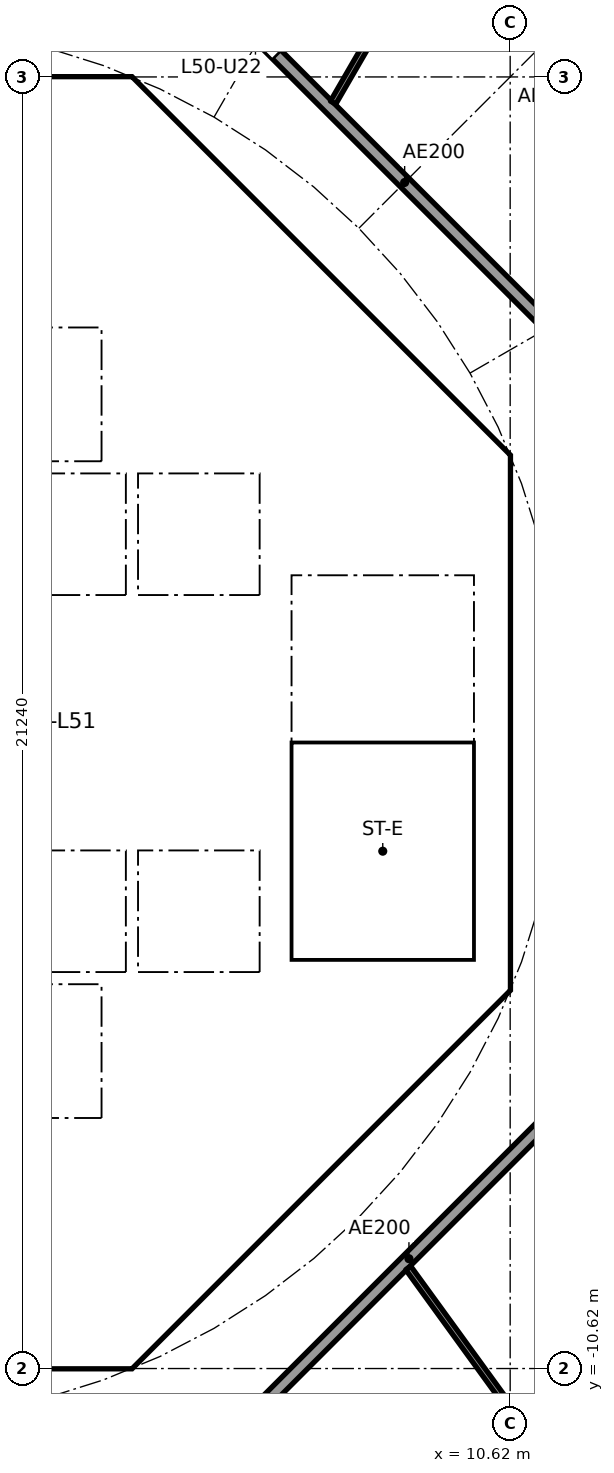
"""IFC4 building model, lengths in metres.
Left out: names, types, materials, properties, quantities, classifications, styles, units other than length and angle.
Written with IfcOpenShell. Run it as: python <this file> out.ifc"""

import sys

from ifc_helpers import new_model, si_unit, direction, frame, frame_2d, origin, place, context, subcontext, project, spatial, polyline, rectangle, outline, extrude, element, fill, save


model = new_model("IFC4")
c1 = context("Model", 3, precision=1e-05, world=origin(), true_north=direction((0.0, 1.0)))
c2 = subcontext(c1, "Body", "Model", "MODEL_VIEW")
j1 = project(units=[si_unit("LENGTHUNIT", "METRE"), si_unit("PLANEANGLEUNIT", "RADIAN")], contexts=[c1])
p1 = place(None, origin())
s1 = spatial("IfcSite", under=j1, at=p1, CompositionType="ELEMENT")
p2 = place(p1, origin())
s2 = spatial("IfcBuilding", under=s1, at=p2, CompositionType="ELEMENT")
p3 = place(p2, frame((0.0, 0.0, 199.2)))
s3 = spatial("IfcBuildingStorey", under=s2, at=p3, CompositionType="ELEMENT", Elevation=199.2)
p4 = place(p3, frame((9.988, 4.613, 0.0), z_axis=(0.0, 0.0, 1.0), x_axis=(-0.707106781187, 0.707106781187, 0.0)))
e1 = element("IfcWall", 1, at=p4, inside=s3, PredefinedType="SHEAR", context=c2, shape_type="SweptSolid", body=[
    extrude(rectangle(XDim=7.602, YDim=0.6, at=frame_2d((3.801, 0.0))), origin(), (0.0, 0.0, 1.0), 3.44),
])
p5 = place(p4, frame((3.201, 0.0, 0.0)))
e2 = element("IfcOpeningElement", 2, at=p5, cuts=e1, PredefinedType="OPENING", context=c2, shape_type="SweptSolid", body=[
    extrude(rectangle(XDim=1.2, YDim=2.1, at=frame_2d((0.6, 1.05))), frame((0.0, 0.31, 0.0), z_axis=(0.0, -1.0, 0.0), x_axis=(1.0, 0.0, 0.0)), (0.0, 0.0, 1.0), 0.62),
])
p6 = place(p3, frame((4.613, -9.988, 0.0), z_axis=(0.0, 0.0, 1.0), x_axis=(0.707106781187, 0.707106781187, 0.0)))
e3 = element("IfcWall", 3, at=p6, inside=s3, PredefinedType="SHEAR", context=c2, shape_type="SweptSolid", body=[
    extrude(rectangle(XDim=7.602, YDim=0.6, at=frame_2d((3.801, 0.0))), origin(), (0.0, 0.0, 1.0), 3.44),
])
p7 = place(p6, frame((3.201, 0.0, 0.0)))
e4 = element("IfcOpeningElement", 4, at=p7, cuts=e3, PredefinedType="OPENING", context=c2, shape_type="SweptSolid", body=[
    extrude(rectangle(XDim=1.2, YDim=2.1, at=frame_2d((0.6, 1.05))), frame((0.0, 0.31, 0.0), z_axis=(0.0, -1.0, 0.0), x_axis=(1.0, 0.0, 0.0)), (0.0, 0.0, 1.0), 0.62),
])
p8 = place(p3, frame((4.0, 4.3, 0.0), z_axis=(0.0, 0.0, 1.0), x_axis=(0.0, 1.0, 0.0)))
e5 = element("IfcWall", 5, at=p8, inside=s3, PredefinedType="SOLIDWALL", context=c2, shape_type="SweptSolid", body=[
    extrude(rectangle(XDim=2.2, YDim=0.2, at=frame_2d((1.1, 0.0))), origin(), (0.0, 0.0, 1.0), 3.44),
])
p9 = place(p8, frame((0.55, 0.0, 0.0)))
e6 = element("IfcOpeningElement", 6, at=p9, cuts=e5, PredefinedType="OPENING", context=c2, shape_type="SweptSolid", body=[
    extrude(rectangle(XDim=1.1, YDim=2.1, at=frame_2d((0.55, 1.05))), frame((0.0, 0.11, 0.0), z_axis=(0.0, -1.0, 0.0), x_axis=(1.0, 0.0, 0.0)), (0.0, 0.0, 1.0), 0.22),
])
p10 = place(p3, frame((-6.7, 2.0, 0.0), z_axis=(0.0, 0.0, 1.0), x_axis=(1.0, 0.0, 0.0)))
e7 = element("IfcWall", 7, at=p10, inside=s3, PredefinedType="SOLIDWALL", context=c2, shape_type="SweptSolid", body=[
    extrude(rectangle(XDim=13.4, YDim=0.2, at=frame_2d((6.7, 0.0))), origin(), (0.0, 0.0, 1.0), 3.44),
])
p11 = place(p10, frame((7.25, 0.0, 0.0)))
e8 = element("IfcOpeningElement", 8, at=p11, cuts=e7, PredefinedType="OPENING", context=c2, shape_type="SweptSolid", body=[
    extrude(rectangle(XDim=1.1, YDim=2.1, at=frame_2d((0.55, 1.05))), frame((0.0, 0.11, 0.0), z_axis=(0.0, -1.0, 0.0), x_axis=(1.0, 0.0, 0.0)), (0.0, 0.0, 1.0), 0.22),
])
p12 = place(p10, frame((9.45, 0.0, 0.0)))
e9 = element("IfcOpeningElement", 9, at=p12, cuts=e7, PredefinedType="OPENING", context=c2, shape_type="SweptSolid", body=[
    extrude(rectangle(XDim=1.1, YDim=2.1, at=frame_2d((0.55, 1.05))), frame((0.0, 0.11, 0.0), z_axis=(0.0, -1.0, 0.0), x_axis=(1.0, 0.0, 0.0)), (0.0, 0.0, 1.0), 0.22),
])
p13 = place(p10, frame((2.95, 0.0, 0.0)))
e10 = element("IfcOpeningElement", 10, at=p13, cuts=e7, PredefinedType="OPENING", context=c2, shape_type="SweptSolid", body=[
    extrude(rectangle(XDim=0.9, YDim=2.1, at=frame_2d((0.45, 1.05))), frame((0.0, 0.11, 0.0), z_axis=(0.0, -1.0, 0.0), x_axis=(1.0, 0.0, 0.0)), (0.0, 0.0, 1.0), 0.22),
])
p14 = place(p3, frame((6.7, 4.0, 0.0), z_axis=(0.0, 0.0, 1.0), x_axis=(1.0, 0.0, 0.0)))
e11 = element("IfcWall", 11, at=p14, inside=s3, PredefinedType="SOLIDWALL", context=c2, shape_type="SweptSolid", body=[
    extrude(rectangle(XDim=3.325, YDim=0.2, at=frame_2d((1.662, 0.0))), origin(), (0.0, 0.0, 1.0), 3.44),
])
p15 = place(p14, frame((1.25, 0.0, 0.0)))
e12 = element("IfcOpeningElement", 12, at=p15, cuts=e11, PredefinedType="OPENING", context=c2, shape_type="SweptSolid", body=[
    extrude(rectangle(XDim=1.1, YDim=2.1, at=frame_2d((0.55, 1.05))), frame((0.0, 0.11, 0.0), z_axis=(0.0, -1.0, 0.0), x_axis=(1.0, 0.0, 0.0)), (0.0, 0.0, 1.0), 0.22),
])
p16 = place(p3, frame((4.0, 7.025, 0.0), z_axis=(0.0, 0.0, 1.0), x_axis=(0.0, 1.0, 0.0)))
e13 = element("IfcWall", 13, at=p16, inside=s3, PredefinedType="SOLIDWALL", context=c2, shape_type="SweptSolid", body=[
    extrude(rectangle(XDim=3.0, YDim=0.2, at=frame_2d((1.5, 0.0))), origin(), (0.0, 0.0, 1.0), 3.44),
])
p17 = place(p16, frame((0.925, 0.0, 0.0)))
e14 = element("IfcOpeningElement", 14, at=p17, cuts=e13, PredefinedType="OPENING", context=c2, shape_type="SweptSolid", body=[
    extrude(rectangle(XDim=1.1, YDim=2.1, at=frame_2d((0.55, 1.05))), frame((0.0, 0.11, 0.0), z_axis=(0.0, -1.0, 0.0), x_axis=(1.0, 0.0, 0.0)), (0.0, 0.0, 1.0), 0.22),
])
p18 = place(p3, frame((4.0, -10.025, 0.0), z_axis=(0.0, 0.0, 1.0), x_axis=(0.0, 1.0, 0.0)))
e15 = element("IfcWall", 15, at=p18, inside=s3, PredefinedType="SOLIDWALL", context=c2, shape_type="SweptSolid", body=[
    extrude(rectangle(XDim=3.0, YDim=0.2, at=frame_2d((1.5, 0.0))), origin(), (0.0, 0.0, 1.0), 3.44),
])
p19 = place(p18, frame((0.975, 0.0, 0.0)))
e16 = element("IfcOpeningElement", 16, at=p19, cuts=e15, PredefinedType="OPENING", context=c2, shape_type="SweptSolid", body=[
    extrude(rectangle(XDim=1.1, YDim=2.1, at=frame_2d((0.55, 1.05))), frame((0.0, 0.11, 0.0), z_axis=(0.0, -1.0, 0.0), x_axis=(1.0, 0.0, 0.0)), (0.0, 0.0, 1.0), 0.22),
])
p20 = place(p3, frame((4.0, -6.5, 0.0), z_axis=(0.0, 0.0, 1.0), x_axis=(0.0, 1.0, 0.0)))
e17 = element("IfcWall", 17, at=p20, inside=s3, PredefinedType="SOLIDWALL", context=c2, shape_type="SweptSolid", body=[
    extrude(rectangle(XDim=2.2, YDim=0.2, at=frame_2d((1.1, 0.0))), origin(), (0.0, 0.0, 1.0), 3.44),
])
p21 = place(p20, frame((0.55, 0.0, 0.0)))
e18 = element("IfcOpeningElement", 18, at=p21, cuts=e17, PredefinedType="OPENING", context=c2, shape_type="SweptSolid", body=[
    extrude(rectangle(XDim=1.1, YDim=2.1, at=frame_2d((0.55, 1.05))), frame((0.0, 0.11, 0.0), z_axis=(0.0, -1.0, 0.0), x_axis=(1.0, 0.0, 0.0)), (0.0, 0.0, 1.0), 0.22),
])
p22 = place(p3, frame((-6.7, -2.0, 0.0), z_axis=(0.0, 0.0, 1.0), x_axis=(1.0, 0.0, 0.0)))
e19 = element("IfcWall", 19, at=p22, inside=s3, PredefinedType="SOLIDWALL", context=c2, shape_type="SweptSolid", body=[
    extrude(rectangle(XDim=13.4, YDim=0.2, at=frame_2d((6.7, 0.0))), origin(), (0.0, 0.0, 1.0), 3.44),
])
p23 = place(p22, frame((5.05, 0.0, 0.0)))
e20 = element("IfcOpeningElement", 20, at=p23, cuts=e19, PredefinedType="OPENING", context=c2, shape_type="SweptSolid", body=[
    extrude(rectangle(XDim=1.1, YDim=2.1, at=frame_2d((0.55, 1.05))), frame((0.0, 0.11, 0.0), z_axis=(0.0, -1.0, 0.0), x_axis=(1.0, 0.0, 0.0)), (0.0, 0.0, 1.0), 0.22),
])
p24 = place(p22, frame((7.25, 0.0, 0.0)))
e21 = element("IfcOpeningElement", 21, at=p24, cuts=e19, PredefinedType="OPENING", context=c2, shape_type="SweptSolid", body=[
    extrude(rectangle(XDim=1.1, YDim=2.1, at=frame_2d((0.55, 1.05))), frame((0.0, 0.11, 0.0), z_axis=(0.0, -1.0, 0.0), x_axis=(1.0, 0.0, 0.0)), (0.0, 0.0, 1.0), 0.22),
])
p25 = place(p22, frame((0.75, 0.0, 0.0)))
e22 = element("IfcOpeningElement", 22, at=p25, cuts=e19, PredefinedType="OPENING", context=c2, shape_type="SweptSolid", body=[
    extrude(rectangle(XDim=0.9, YDim=2.1, at=frame_2d((0.45, 1.05))), frame((0.0, 0.11, 0.0), z_axis=(0.0, -1.0, 0.0), x_axis=(1.0, 0.0, 0.0)), (0.0, 0.0, 1.0), 0.22),
])
p26 = place(p22, frame((2.95, 0.0, 0.0)))
e23 = element("IfcOpeningElement", 23, at=p26, cuts=e19, PredefinedType="OPENING", context=c2, shape_type="SweptSolid", body=[
    extrude(rectangle(XDim=0.9, YDim=2.1, at=frame_2d((0.45, 1.05))), frame((0.0, 0.11, 0.0), z_axis=(0.0, -1.0, 0.0), x_axis=(1.0, 0.0, 0.0)), (0.0, 0.0, 1.0), 0.22),
])
p27 = place(p3, origin())
e24 = element("IfcWall", 24, at=p27, inside=s3, PredefinedType="SHEAR", context=c2, shape_type="SweptSolid", body=[
    extrude(outline(polyline([(-4.152, -10.025), (4.152, -10.025), (4.401, -9.776), (4.825, -10.2), (4.401, -10.625), (-4.401, -10.625), (-4.825, -10.2), (-4.401, -9.776), (-4.152, -10.025)])), origin(), (0.0, 0.0, 1.0), 3.44),
])
p28 = place(p3, origin())
e25 = element("IfcWall", 25, at=p28, inside=s3, PredefinedType="SHEAR", context=c2, shape_type="SweptSolid", body=[
    extrude(outline(polyline([(-4.152, 10.025), (-4.401, 9.776), (-4.825, 10.2), (-4.401, 10.625), (4.401, 10.625), (4.825, 10.2), (4.401, 9.776), (4.152, 10.025), (-4.152, 10.025)])), origin(), (0.0, 0.0, 1.0), 3.44),
])
p29 = place(p3, origin())
e26 = element("IfcWall", 26, at=p29, inside=s3, PredefinedType="SHEAR", context=c2, shape_type="SweptSolid", body=[
    extrude(outline(polyline([(9.776, -4.401), (10.025, -4.152), (10.025, -3.801), (10.025, 4.152), (9.776, 4.401), (10.2, 4.825), (10.625, 4.401), (10.625, -4.401), (10.2, -4.825), (9.776, -4.401)])), origin(), (0.0, 0.0, 1.0), 3.44),
])
p30 = place(p3, origin())
e27 = element("IfcWall", 27, at=p30, inside=s3, PredefinedType="SOLIDWALL", context=c2, shape_type="SweptSolid", body=[
    extrude(outline(polyline([(-6.7, -2.1), (-6.5, -2.1), (-6.5, -4.1), (-4.5, -4.1), (-4.5, -2.1), (-4.3, -2.1), (-4.3, -4.1), (-2.3, -4.1), (-2.3, -2.1), (-2.1, -2.1), (-2.1, -4.1), (-0.1, -4.1), (-0.1, -2.1), (0.1, -2.1), (0.1, -4.1), (2.1, -4.1), (2.1, -2.1), (2.3, -2.1), (2.3, -4.1), (4.3, -4.1), (4.3, -2.1), (4.5, -2.1), (4.5, -4.1), (6.5, -4.1), (6.5, -2.1), (6.7, -2.1), (6.7, -4.3), (-6.7, -4.3), (-6.7, -2.1)])), origin(), (0.0, 0.0, 1.0), 3.44),
])
p31 = place(p3, origin())
e28 = element("IfcWall", 28, at=p31, inside=s3, PredefinedType="SOLIDWALL", context=c2, shape_type="SweptSolid", body=[
    extrude(outline(polyline([(-6.7, 4.3), (6.7, 4.3), (6.7, 2.1), (6.5, 2.1), (6.5, 4.1), (4.5, 4.1), (4.5, 2.1), (4.3, 2.1), (4.3, 4.1), (2.3, 4.1), (2.3, 2.1), (2.1, 2.1), (2.1, 4.1), (0.1, 4.1), (0.1, 2.1), (-0.1, 2.1), (-0.1, 4.1), (-6.5, 4.1), (-6.5, 2.1), (-6.7, 2.1), (-6.7, 4.3)])), origin(), (0.0, 0.0, 1.0), 3.44),
])
p32 = place(p3, origin())
e29 = element("IfcWall", 29, at=p32, inside=s3, PredefinedType="SOLIDWALL", context=c2, shape_type="SweptSolid", body=[
    extrude(outline(polyline([(4.1, -7.025), (-4.1, -7.025), (-4.1, -6.5), (4.1, -6.5), (4.1, -7.025)])), origin(), (0.0, 0.0, 1.0), 3.44),
])
p33 = place(p3, origin())
e30 = element("IfcWall", 30, at=p33, inside=s3, PredefinedType="SOLIDWALL", context=c2, shape_type="SweptSolid", body=[
    extrude(outline(polyline([(4.1, 6.5), (-4.1, 6.5), (-4.1, 7.025), (4.1, 7.025), (4.1, 6.5)])), origin(), (0.0, 0.0, 1.0), 3.44),
])
p34 = place(p3, origin())
e31 = element("IfcWall", 31, at=p34, inside=s3, PredefinedType="SOLIDWALL", context=c2, shape_type="SweptSolid", body=[
    extrude(outline(polyline([(7.025, -3.9), (6.7, -3.9), (6.7, 3.9), (7.025, 3.9), (7.025, -3.9)])), origin(), (0.0, 0.0, 1.0), 3.44),
])
p35 = place(p3, origin())
e32 = element("IfcWall", 32, at=p35, inside=s3, PredefinedType="SOLIDWALL", context=c2, shape_type="SweptSolid", body=[
    extrude(outline(polyline([(10.025, -4.1), (6.7, -4.1), (6.7, -3.9), (10.025, -3.9), (10.025, -4.1)])), origin(), (0.0, 0.0, 1.0), 3.44),
])
p36 = place(p3, frame((12.635, 5.134, 0.0), z_axis=(0.0, 0.0, 1.0), x_axis=(-0.707106781187, 0.707106781187, 0.0)))
e33 = element("IfcWall", 33, at=p36, inside=s3, PredefinedType="PARTITIONING", context=c2, shape_type="SweptSolid", body=[
    extrude(rectangle(XDim=10.609, YDim=0.2, at=frame_2d((5.305, 0.0))), origin(), (0.0, 0.0, 1.0), 3.44),
])
p37 = place(p36, frame((8.274, 0.0, 0.0)))
e34 = element("IfcOpeningElement", 34, at=p37, cuts=e33, PredefinedType="OPENING", context=c2, shape_type="SweptSolid", body=[
    extrude(rectangle(XDim=1.0, YDim=2.1, at=frame_2d((0.5, 1.05))), frame((0.0, 0.11, 0.0), z_axis=(0.0, -1.0, 0.0), x_axis=(1.0, 0.0, 0.0)), (0.0, 0.0, 1.0), 0.22),
])
p38 = place(p3, frame((5.275, -12.494, 0.0), z_axis=(0.0, 0.0, 1.0), x_axis=(0.707106781187, 0.707106781187, 0.0)))
e35 = element("IfcWall", 35, at=p38, inside=s3, PredefinedType="PARTITIONING", context=c2, shape_type="SweptSolid", body=[
    extrude(rectangle(XDim=10.409, YDim=0.2, at=frame_2d((5.205, 0.0))), origin(), (0.0, 0.0, 1.0), 3.44),
])
p39 = place(p3, frame((7.708, 10.198, 0.0), z_axis=(0.0, 0.0, 1.0), x_axis=(0.501288100085, 0.865280440501, 0.0)))
e36 = element("IfcWall", 36, at=p39, inside=s3, PredefinedType="PARTITIONING", context=c2, shape_type="SweptSolid", body=[
    extrude(rectangle(XDim=10.623, YDim=0.1, at=frame_2d((5.312, 0.0))), origin(), (0.0, 0.0, 1.0), 2.756),
])
p40 = place(p39, frame((2.082, 0.0, 0.0)))
e37 = element("IfcOpeningElement", 37, at=p40, cuts=e36, PredefinedType="OPENING", context=c2, shape_type="SweptSolid", body=[
    extrude(rectangle(XDim=0.9, YDim=2.1, at=frame_2d((0.45, 1.05))), frame((0.0, 0.06, 0.0), z_axis=(0.0, -1.0, 0.0), x_axis=(1.0, 0.0, 0.0)), (0.0, 0.0, 1.0), 0.12),
])
p41 = place(p39, frame((7.369, 0.0, 0.0)))
e38 = element("IfcOpeningElement", 38, at=p41, cuts=e36, PredefinedType="OPENING", context=c2, shape_type="SweptSolid", body=[
    extrude(rectangle(XDim=0.9, YDim=2.1, at=frame_2d((0.45, 1.05))), frame((0.0, 0.06, 0.0), z_axis=(0.0, -1.0, 0.0), x_axis=(1.0, 0.0, 0.0)), (0.0, 0.0, 1.0), 0.12),
])
p42 = place(p3, frame((8.943, -8.966, 0.0), z_axis=(0.0, 0.0, 1.0), x_axis=(0.587181355751, -0.809455406714, 0.0)))
e39 = element("IfcWall", 39, at=p42, inside=s3, PredefinedType="PARTITIONING", context=c2, shape_type="SweptSolid", body=[
    extrude(rectangle(XDim=10.441, YDim=0.1, at=frame_2d((5.221, 0.0))), origin(), (0.0, 0.0, 1.0), 2.756),
])
p43 = place(p12, origin())
e40 = element("IfcDoor", 40, at=p43, inside=s3, OperationType="DOUBLE_DOOR_SLIDING", PredefinedType="DOOR", context=c2, shape_type="SweptSolid", body=[
    extrude(rectangle(XDim=1.1, YDim=2.1, at=frame_2d((0.55, 1.05))), frame((0.0, 0.025, 0.0), z_axis=(0.0, -1.0, 0.0), x_axis=(1.0, 0.0, 0.0)), (0.0, 0.0, 1.0), 0.05),
])
fill(e9, e40)
p44 = place(p9, origin())
e41 = element("IfcDoor", 41, at=p44, inside=s3, OperationType="DOUBLE_DOOR_SLIDING", PredefinedType="DOOR", context=c2, shape_type="SweptSolid", body=[
    extrude(rectangle(XDim=1.1, YDim=2.1, at=frame_2d((0.55, 1.05))), frame((0.0, 0.025, 0.0), z_axis=(0.0, -1.0, 0.0), x_axis=(1.0, 0.0, 0.0)), (0.0, 0.0, 1.0), 0.05),
])
fill(e6, e41)
p45 = place(p21, origin())
e42 = element("IfcDoor", 42, at=p45, inside=s3, OperationType="DOUBLE_DOOR_SLIDING", PredefinedType="DOOR", context=c2, shape_type="SweptSolid", body=[
    extrude(rectangle(XDim=1.1, YDim=2.1, at=frame_2d((0.55, 1.05))), frame((0.0, 0.025, 0.0), z_axis=(0.0, -1.0, 0.0), x_axis=(1.0, 0.0, 0.0)), (0.0, 0.0, 1.0), 0.05),
])
fill(e18, e42)
p46 = place(p15, frame((1.1, 0.0, 0.0), x_axis=(-1.0, 0.0, 0.0)))
e43 = element("IfcDoor", 43, at=p46, inside=s3, OperationType="SINGLE_SWING_LEFT", PredefinedType="DOOR", context=c2, shape_type="SweptSolid", body=[
    extrude(rectangle(XDim=1.1, YDim=2.1, at=frame_2d((0.55, 1.05))), frame((0.0, 0.025, 0.0), z_axis=(0.0, -1.0, 0.0), x_axis=(1.0, 0.0, 0.0)), (0.0, 0.0, 1.0), 0.05),
])
fill(e12, e43)
p47 = place(p17, origin())
e44 = element("IfcDoor", 44, at=p47, inside=s3, OperationType="SINGLE_SWING_RIGHT", PredefinedType="DOOR", context=c2, shape_type="SweptSolid", body=[
    extrude(rectangle(XDim=1.1, YDim=2.1, at=frame_2d((0.55, 1.05))), frame((0.0, 0.025, 0.0), z_axis=(0.0, -1.0, 0.0), x_axis=(1.0, 0.0, 0.0)), (0.0, 0.0, 1.0), 0.05),
])
fill(e14, e44)
p48 = place(p19, origin())
e45 = element("IfcDoor", 45, at=p48, inside=s3, OperationType="SINGLE_SWING_LEFT", PredefinedType="DOOR", context=c2, shape_type="SweptSolid", body=[
    extrude(rectangle(XDim=1.1, YDim=2.1, at=frame_2d((0.55, 1.05))), frame((0.0, 0.025, 0.0), z_axis=(0.0, -1.0, 0.0), x_axis=(1.0, 0.0, 0.0)), (0.0, 0.0, 1.0), 0.05),
])
fill(e16, e45)
p49 = place(p5, origin())
e46 = element("IfcDoor", 46, at=p49, inside=s3, OperationType="SINGLE_SWING_RIGHT", PredefinedType="DOOR", context=c2, shape_type="SweptSolid", body=[
    extrude(rectangle(XDim=1.2, YDim=2.1, at=frame_2d((0.6, 1.05))), frame((0.0, 0.025, 0.0), z_axis=(0.0, -1.0, 0.0), x_axis=(1.0, 0.0, 0.0)), (0.0, 0.0, 1.0), 0.05),
])
fill(e2, e46)
p50 = place(p7, origin())
e47 = element("IfcDoor", 47, at=p50, inside=s3, OperationType="SINGLE_SWING_RIGHT", PredefinedType="DOOR", context=c2, shape_type="SweptSolid", body=[
    extrude(rectangle(XDim=1.2, YDim=2.1, at=frame_2d((0.6, 1.05))), frame((0.0, 0.025, 0.0), z_axis=(0.0, -1.0, 0.0), x_axis=(1.0, 0.0, 0.0)), (0.0, 0.0, 1.0), 0.05),
])
fill(e4, e47)
p51 = place(p37, frame((1.0, 0.0, 0.0), x_axis=(-1.0, 0.0, 0.0)))
e48 = element("IfcDoor", 48, at=p51, inside=s3, OperationType="SINGLE_SWING_LEFT", PredefinedType="DOOR", context=c2, shape_type="SweptSolid", body=[
    extrude(rectangle(XDim=1.0, YDim=2.1, at=frame_2d((0.5, 1.05))), frame((0.0, 0.025, 0.0), z_axis=(0.0, -1.0, 0.0), x_axis=(1.0, 0.0, 0.0)), (0.0, 0.0, 1.0), 0.05),
])
fill(e34, e48)
save(model, sys.argv[1])
